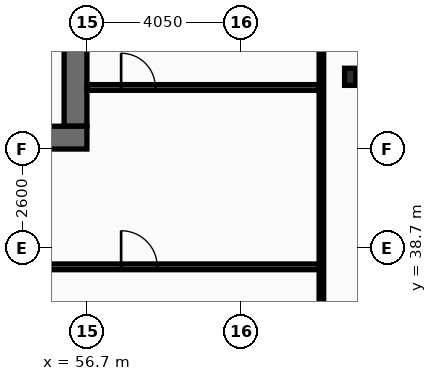
"""IFC4 building model, lengths in metres.
Left out: names, types, materials, properties, quantities, classifications, styles, units other than length and angle.
Written with IfcOpenShell. Run it as: python <this file> out.ifc"""

import sys

from ifc_helpers import new_model, si_unit, direction, frame, frame_2d, origin, origin_2d, place, context, subcontext, project, spatial, rectangle, i_section, extrude, element, fill, save


model = new_model("IFC4")
c1 = context("Model", 3, precision=1e-05, world=origin(), true_north=direction((0.0, 1.0)))
c2 = subcontext(c1, "Body", "Model", "MODEL_VIEW")
j1 = project(units=[si_unit("LENGTHUNIT", "METRE"), si_unit("PLANEANGLEUNIT", "RADIAN")], contexts=[c1])
p1 = place(None, origin())
s1 = spatial("IfcSite", under=j1, at=p1, CompositionType="ELEMENT")
p2 = place(p1, origin())
s2 = spatial("IfcBuilding", under=s1, at=p2, CompositionType="ELEMENT")
p3 = place(p2, frame((0.0, 0.0, 242.6)))
s3 = spatial("IfcBuildingStorey", under=s2, at=p3, CompositionType="ELEMENT", Elevation=242.6)
p4 = place(p3, frame((56.4, 53.1, 0.0), z_axis=(0.0, 0.0, 1.0), x_axis=(0.0, -1.0, 0.0)))
e1 = element("IfcWall", 1, at=p4, inside=s3, PredefinedType="SHEAR", context=c2, shape_type="SweptSolid", body=[
    extrude(rectangle(XDim=11.2, YDim=0.6, at=frame_2d((5.6, 0.0))), origin(), (0.0, 0.0, 1.0), 3.44),
])
p5 = place(p3, frame((56.7, 41.6, 0.0), z_axis=(0.0, 0.0, 1.0), x_axis=(-1.0, 0.0, 0.0)))
e2 = element("IfcWall", 2, at=p5, inside=s3, PredefinedType="SHEAR", context=c2, shape_type="SweptSolid", body=[
    extrude(rectangle(XDim=2.45, YDim=0.6, at=frame_2d((1.225, 0.0))), origin(), (0.0, 0.0, 1.0), 3.44),
])
p6 = place(p3, frame((63.63, 43.2, 0.0), z_axis=(0.0, 0.0, 1.0), x_axis=(1.0, 0.0, 0.0)))
e3 = element("IfcColumn", 3, at=p6, inside=s3, PredefinedType="COLUMN", context=c2, shape_type="SweptSolid", body=[
    extrude(i_section(OverallWidth=0.3, OverallDepth=0.45, WebThickness=0.014, FlangeThickness=0.026, at=origin_2d()), origin(), (0.0, 0.0, 1.0), 3.6),
])
p7 = place(p3, frame((54.35, 38.2, 0.0), z_axis=(0.0, 0.0, 1.0), x_axis=(1.0, 0.0, 0.0)))
e4 = element("IfcWall", 4, at=p7, inside=s3, PredefinedType="PARTITIONING", context=c2, shape_type="SweptSolid", body=[
    extrude(rectangle(XDim=8.52, YDim=0.15, at=frame_2d((4.26, 0.0))), origin(), (0.0, 0.0, 1.0), 2.78),
])
p8 = place(p7, frame((3.25, 0.0, 0.0)))
e5 = element("IfcOpeningElement", 5, at=p8, cuts=e4, PredefinedType="OPENING", context=c2, shape_type="SweptSolid", body=[
    extrude(rectangle(XDim=0.95, YDim=2.05, at=frame_2d((0.475, 1.025))), frame((0.0, 0.085, 0.0), z_axis=(0.0, -1.0, 0.0), x_axis=(1.0, 0.0, 0.0)), (0.0, 0.0, 1.0), 0.17),
])
p9 = place(p3, frame((56.7, 42.92, 0.0), z_axis=(0.0, 0.0, 1.0), x_axis=(1.0, 0.0, 0.0)))
e6 = element("IfcWall", 6, at=p9, inside=s3, PredefinedType="PARTITIONING", context=c2, shape_type="SweptSolid", body=[
    extrude(rectangle(XDim=6.105, YDim=0.15, at=frame_2d((3.052, 0.0))), origin(), (0.0, 0.0, 1.0), 2.78),
])
p10 = place(p9, frame((0.9, 0.0, 0.0)))
e7 = element("IfcOpeningElement", 7, at=p10, cuts=e6, PredefinedType="OPENING", context=c2, shape_type="SweptSolid", body=[
    extrude(rectangle(XDim=0.9, YDim=2.05, at=frame_2d((0.45, 1.025))), frame((0.0, 0.085, 0.0), z_axis=(0.0, -1.0, 0.0), x_axis=(1.0, 0.0, 0.0)), (0.0, 0.0, 1.0), 0.17),
])
p11 = place(p3, frame((62.87, 10.665, 0.0), z_axis=(0.0, 0.0, 1.0), x_axis=(0.0, 1.0, 0.0)))
e8 = element("IfcWall", 8, at=p11, inside=s3, PredefinedType="PARTITIONING", context=c2, shape_type="SweptSolid", body=[
    extrude(rectangle(XDim=42.11, YDim=0.12, at=frame_2d((21.055, 0.0))), origin(), (0.0, 0.0, 1.0), 2.78),
])
p12 = place(p8, origin())
e9 = element("IfcDoor", 9, at=p12, inside=s3, OperationType="SINGLE_SWING_LEFT", PredefinedType="DOOR", context=c2, shape_type="SweptSolid", body=[
    extrude(rectangle(XDim=0.95, YDim=2.05, at=frame_2d((0.475, 1.025))), frame((0.0, 0.025, 0.0), z_axis=(0.0, -1.0, 0.0), x_axis=(1.0, 0.0, 0.0)), (0.0, 0.0, 1.0), 0.05),
])
fill(e5, e9)
p13 = place(p10, origin())
e10 = element("IfcDoor", 10, at=p13, inside=s3, OperationType="SINGLE_SWING_LEFT", PredefinedType="DOOR", context=c2, shape_type="SweptSolid", body=[
    extrude(rectangle(XDim=0.9, YDim=2.05, at=frame_2d((0.45, 1.025))), frame((0.0, 0.025, 0.0), z_axis=(0.0, -1.0, 0.0), x_axis=(1.0, 0.0, 0.0)), (0.0, 0.0, 1.0), 0.05),
])
fill(e7, e10)
save(model, sys.argv[1])
